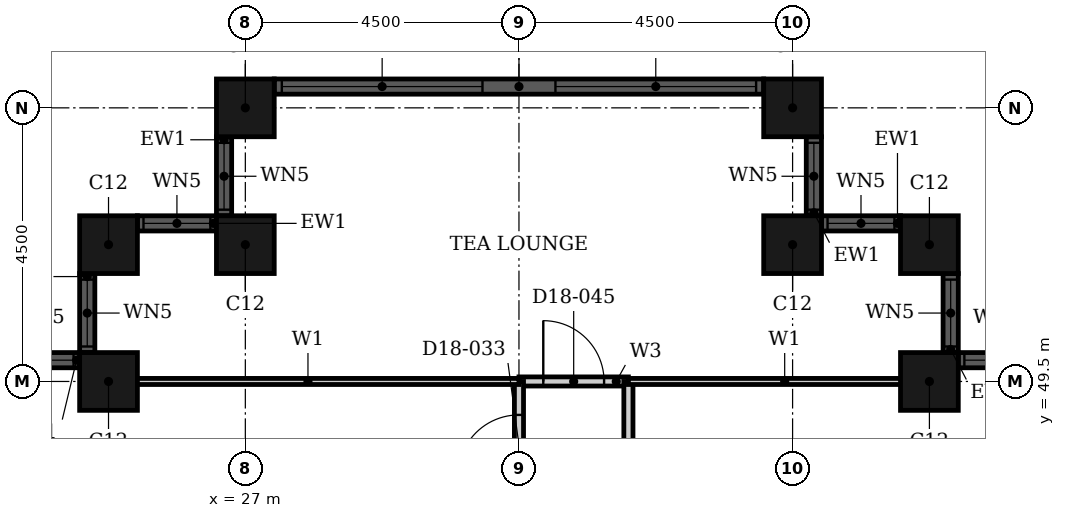
"""IFC4 building model, lengths in metres.
Left out: names, types, materials, properties, quantities, classifications, styles, units other than length and angle.
Written with IfcOpenShell. Run it as: python <this file> out.ifc"""

import sys

from ifc_helpers import new_model, si_unit, direction, frame, frame_2d, origin, origin_2d, place, context, subcontext, project, spatial, rectangle, hollow_rectangle, extrude, element, fill, save


model = new_model("IFC4")
c1 = context("Model", 3, precision=1e-05, world=origin(), true_north=direction((0.0, 1.0)))
c2 = subcontext(c1, "Body", "Model", "MODEL_VIEW")
j1 = project(units=[si_unit("LENGTHUNIT", "METRE"), si_unit("PLANEANGLEUNIT", "RADIAN")], contexts=[c1])
p1 = place(None, origin())
s1 = spatial("IfcSite", under=j1, at=p1, CompositionType="ELEMENT")
p2 = place(p1, origin())
s2 = spatial("IfcBuilding", under=s1, at=p2, CompositionType="ELEMENT")
p3 = place(p2, frame((0.0, 0.0, 78.0)))
s3 = spatial("IfcBuildingStorey", under=s2, at=p3, CompositionType="ELEMENT", Elevation=78.0)
for number, where, z_axis, x_axis in (
    (1, (38.25, 49.5, 0.0), (0.0, 0.0, 1.0), (1.0, 0.0, 0.0)),
    (2, (38.25, 51.75, 0.0), (0.0, 0.0, 1.0), (1.0, 0.0, 0.0)),
    (3, (36.0, 51.75, 0.0), (0.0, 0.0, 1.0), (1.0, 0.0, 0.0)),
    (4, (36.0, 54.0, 0.0), (0.0, 0.0, 1.0), (1.0, 0.0, 0.0)),
    (5, (27.0, 54.0, 0.0), (0.0, 0.0, 1.0), (1.0, 0.0, 0.0)),
    (6, (27.0, 51.75, 0.0), (0.0, 0.0, 1.0), (1.0, 0.0, 0.0)),
    (7, (24.75, 51.75, 0.0), (0.0, 0.0, 1.0), (1.0, 0.0, 0.0)),
    (8, (24.75, 49.5, 0.0), (0.0, 0.0, 1.0), (1.0, 0.0, 0.0)),
):
    element("IfcColumn", number, at=place(p3, frame(where, z_axis=z_axis, x_axis=x_axis)), inside=s3, PredefinedType="COLUMN", context=c2, shape_type="SweptSolid", body=[
        extrude(hollow_rectangle(XDim=0.95, YDim=0.95, WallThickness=0.03, at=origin_2d()), origin(), (0.0, 0.0, 1.0), 3.6),
    ])
p4 = place(p3, frame((40.025, 49.85, 0.0), z_axis=(0.0, 0.0, 1.0), x_axis=(-1.0, 0.0, 0.0)))
e9 = element("IfcWall", 9, at=p4, inside=s3, PredefinedType="SOLIDWALL", context=c2, shape_type="SweptSolid", body=[
    extrude(rectangle(XDim=1.3, YDim=0.25, at=frame_2d((0.65, 0.0))), origin(), (0.0, 0.0, 1.0), 3.6),
])
p5 = place(p4, frame((0.1, 0.0, 0.9)))
e10 = element("IfcOpeningElement", 10, at=p5, cuts=e9, PredefinedType="OPENING", context=c2, shape_type="SweptSolid", body=[
    extrude(rectangle(XDim=1.1, YDim=2.08, at=frame_2d((0.55, 1.04))), frame((0.0, 0.135, 0.0), z_axis=(0.0, -1.0, 0.0), x_axis=(1.0, 0.0, 0.0)), (0.0, 0.0, 1.0), 0.27),
])
p6 = place(p3, frame((38.6, 49.975, 0.0), z_axis=(0.0, 0.0, 1.0), x_axis=(0.0, 1.0, 0.0)))
e11 = element("IfcWall", 11, at=p6, inside=s3, PredefinedType="SOLIDWALL", context=c2, shape_type="SweptSolid", body=[
    extrude(rectangle(XDim=1.3, YDim=0.25, at=frame_2d((0.65, 0.0))), origin(), (0.0, 0.0, 1.0), 3.6),
])
p7 = place(p6, frame((0.1, 0.0, 0.9)))
e12 = element("IfcOpeningElement", 12, at=p7, cuts=e11, PredefinedType="OPENING", context=c2, shape_type="SweptSolid", body=[
    extrude(rectangle(XDim=1.1, YDim=2.08, at=frame_2d((0.55, 1.04))), frame((0.0, 0.135, 0.0), z_axis=(0.0, -1.0, 0.0), x_axis=(1.0, 0.0, 0.0)), (0.0, 0.0, 1.0), 0.27),
])
p8 = place(p3, frame((37.775, 52.1, 0.0), z_axis=(0.0, 0.0, 1.0), x_axis=(-1.0, 0.0, 0.0)))
e13 = element("IfcWall", 13, at=p8, inside=s3, PredefinedType="SOLIDWALL", context=c2, shape_type="SweptSolid", body=[
    extrude(rectangle(XDim=1.3, YDim=0.25, at=frame_2d((0.65, 0.0))), origin(), (0.0, 0.0, 1.0), 3.6),
])
p9 = place(p8, frame((0.1, 0.0, 0.9)))
e14 = element("IfcOpeningElement", 14, at=p9, cuts=e13, PredefinedType="OPENING", context=c2, shape_type="SweptSolid", body=[
    extrude(rectangle(XDim=1.1, YDim=2.08, at=frame_2d((0.55, 1.04))), frame((0.0, 0.135, 0.0), z_axis=(0.0, -1.0, 0.0), x_axis=(1.0, 0.0, 0.0)), (0.0, 0.0, 1.0), 0.27),
])
p10 = place(p3, frame((36.35, 52.225, 0.0), z_axis=(0.0, 0.0, 1.0), x_axis=(0.0, 1.0, 0.0)))
e15 = element("IfcWall", 15, at=p10, inside=s3, PredefinedType="SOLIDWALL", context=c2, shape_type="SweptSolid", body=[
    extrude(rectangle(XDim=1.3, YDim=0.25, at=frame_2d((0.65, 0.0))), origin(), (0.0, 0.0, 1.0), 3.6),
])
p11 = place(p10, frame((0.1, 0.0, 0.9)))
e16 = element("IfcOpeningElement", 16, at=p11, cuts=e15, PredefinedType="OPENING", context=c2, shape_type="SweptSolid", body=[
    extrude(rectangle(XDim=1.1, YDim=2.08, at=frame_2d((0.55, 1.04))), frame((0.0, 0.135, 0.0), z_axis=(0.0, -1.0, 0.0), x_axis=(1.0, 0.0, 0.0)), (0.0, 0.0, 1.0), 0.27),
])
p12 = place(p3, frame((35.525, 54.35, 0.0), z_axis=(0.0, 0.0, 1.0), x_axis=(-1.0, 0.0, 0.0)))
e17 = element("IfcWall", 17, at=p12, inside=s3, PredefinedType="SOLIDWALL", context=c2, shape_type="SweptSolid", body=[
    extrude(rectangle(XDim=8.05, YDim=0.25, at=frame_2d((4.025, 0.0))), origin(), (0.0, 0.0, 1.0), 3.6),
])
p13 = place(p12, frame((0.125, 0.0, 0.9)))
e18 = element("IfcOpeningElement", 18, at=p13, cuts=e17, PredefinedType="OPENING", context=c2, shape_type="SweptSolid", body=[
    extrude(rectangle(XDim=3.3, YDim=2.08, at=frame_2d((1.65, 1.04))), frame((0.0, 0.135, 0.0), z_axis=(0.0, -1.0, 0.0), x_axis=(1.0, 0.0, 0.0)), (0.0, 0.0, 1.0), 0.27),
])
p14 = place(p12, frame((4.625, 0.0, 0.9)))
e19 = element("IfcOpeningElement", 19, at=p14, cuts=e17, PredefinedType="OPENING", context=c2, shape_type="SweptSolid", body=[
    extrude(rectangle(XDim=3.3, YDim=2.08, at=frame_2d((1.65, 1.04))), frame((0.0, 0.135, 0.0), z_axis=(0.0, -1.0, 0.0), x_axis=(1.0, 0.0, 0.0)), (0.0, 0.0, 1.0), 0.27),
])
p15 = place(p3, frame((26.65, 53.525, 0.0), z_axis=(0.0, 0.0, 1.0), x_axis=(0.0, -1.0, 0.0)))
e20 = element("IfcWall", 20, at=p15, inside=s3, PredefinedType="SOLIDWALL", context=c2, shape_type="SweptSolid", body=[
    extrude(rectangle(XDim=1.3, YDim=0.25, at=frame_2d((0.65, 0.0))), origin(), (0.0, 0.0, 1.0), 3.6),
])
p16 = place(p15, frame((0.1, 0.0, 0.9)))
e21 = element("IfcOpeningElement", 21, at=p16, cuts=e20, PredefinedType="OPENING", context=c2, shape_type="SweptSolid", body=[
    extrude(rectangle(XDim=1.1, YDim=2.08, at=frame_2d((0.55, 1.04))), frame((0.0, 0.135, 0.0), z_axis=(0.0, -1.0, 0.0), x_axis=(1.0, 0.0, 0.0)), (0.0, 0.0, 1.0), 0.27),
])
p17 = place(p3, frame((26.525, 52.1, 0.0), z_axis=(0.0, 0.0, 1.0), x_axis=(-1.0, 0.0, 0.0)))
e22 = element("IfcWall", 22, at=p17, inside=s3, PredefinedType="SOLIDWALL", context=c2, shape_type="SweptSolid", body=[
    extrude(rectangle(XDim=1.3, YDim=0.25, at=frame_2d((0.65, 0.0))), origin(), (0.0, 0.0, 1.0), 3.6),
])
p18 = place(p17, frame((0.1, 0.0, 0.9)))
e23 = element("IfcOpeningElement", 23, at=p18, cuts=e22, PredefinedType="OPENING", context=c2, shape_type="SweptSolid", body=[
    extrude(rectangle(XDim=1.1, YDim=2.08, at=frame_2d((0.55, 1.04))), frame((0.0, 0.135, 0.0), z_axis=(0.0, -1.0, 0.0), x_axis=(1.0, 0.0, 0.0)), (0.0, 0.0, 1.0), 0.27),
])
p19 = place(p3, frame((24.4, 51.275, 0.0), z_axis=(0.0, 0.0, 1.0), x_axis=(0.0, -1.0, 0.0)))
e24 = element("IfcWall", 24, at=p19, inside=s3, PredefinedType="SOLIDWALL", context=c2, shape_type="SweptSolid", body=[
    extrude(rectangle(XDim=1.3, YDim=0.25, at=frame_2d((0.65, 0.0))), origin(), (0.0, 0.0, 1.0), 3.6),
])
p20 = place(p19, frame((0.1, 0.0, 0.9)))
e25 = element("IfcOpeningElement", 25, at=p20, cuts=e24, PredefinedType="OPENING", context=c2, shape_type="SweptSolid", body=[
    extrude(rectangle(XDim=1.1, YDim=2.08, at=frame_2d((0.55, 1.04))), frame((0.0, 0.135, 0.0), z_axis=(0.0, -1.0, 0.0), x_axis=(1.0, 0.0, 0.0)), (0.0, 0.0, 1.0), 0.27),
])
p21 = place(p3, frame((24.275, 49.85, 0.0), z_axis=(0.0, 0.0, 1.0), x_axis=(-1.0, 0.0, 0.0)))
e26 = element("IfcWall", 26, at=p21, inside=s3, PredefinedType="SOLIDWALL", context=c2, shape_type="SweptSolid", body=[
    extrude(rectangle(XDim=1.3, YDim=0.25, at=frame_2d((0.65, 0.0))), origin(), (0.0, 0.0, 1.0), 3.6),
])
p22 = place(p21, frame((0.1, 0.0, 0.9)))
e27 = element("IfcOpeningElement", 27, at=p22, cuts=e26, PredefinedType="OPENING", context=c2, shape_type="SweptSolid", body=[
    extrude(rectangle(XDim=1.1, YDim=2.08, at=frame_2d((0.55, 1.04))), frame((0.0, 0.135, 0.0), z_axis=(0.0, -1.0, 0.0), x_axis=(1.0, 0.0, 0.0)), (0.0, 0.0, 1.0), 0.27),
])
p23 = place(p3, frame((31.5, 49.5, 0.0), z_axis=(0.0, 0.0, 1.0), x_axis=(1.0, 0.0, 0.0)))
e28 = element("IfcWall", 28, at=p23, inside=s3, PredefinedType="PARTITIONING", context=c2, shape_type="SweptSolid", body=[
    extrude(rectangle(XDim=1.8, YDim=0.15, at=frame_2d((0.9, 0.0))), origin(), (0.0, 0.0, 1.0), 3.3),
])
p24 = place(p23, frame((0.4, 0.0, 0.0)))
e29 = element("IfcOpeningElement", 29, at=p24, cuts=e28, PredefinedType="OPENING", context=c2, shape_type="SweptSolid", body=[
    extrude(rectangle(XDim=1.0, YDim=2.1, at=frame_2d((0.5, 1.05))), frame((0.0, 0.085, 0.0), z_axis=(0.0, -1.0, 0.0), x_axis=(1.0, 0.0, 0.0)), (0.0, 0.0, 1.0), 0.17),
])
p25 = place(p3, frame((31.5, 33.3, 0.0), z_axis=(0.0, 0.0, 1.0), x_axis=(0.0, 1.0, 0.0)))
e30 = element("IfcWall", 30, at=p25, inside=s3, PredefinedType="PARTITIONING", context=c2, shape_type="SweptSolid", body=[
    extrude(rectangle(XDim=16.2, YDim=0.15, at=frame_2d((8.1, 0.0))), origin(), (0.0, 0.0, 1.0), 2.58),
])
p26 = place(p25, frame((10.15, 0.0, 0.0)))
e31 = element("IfcOpeningElement", 31, at=p26, cuts=e30, PredefinedType="OPENING", context=c2, shape_type="SweptSolid", body=[
    extrude(rectangle(XDim=1.0, YDim=2.1, at=frame_2d((0.5, 1.05))), frame((0.0, 0.085, 0.0), z_axis=(0.0, -1.0, 0.0), x_axis=(1.0, 0.0, 0.0)), (0.0, 0.0, 1.0), 0.17),
])
p27 = place(p25, frame((14.65, 0.0, 0.0)))
e32 = element("IfcOpeningElement", 32, at=p27, cuts=e30, PredefinedType="OPENING", context=c2, shape_type="SweptSolid", body=[
    extrude(rectangle(XDim=1.0, YDim=2.1, at=frame_2d((0.5, 1.05))), frame((0.0, 0.085, 0.0), z_axis=(0.0, -1.0, 0.0), x_axis=(1.0, 0.0, 0.0)), (0.0, 0.0, 1.0), 0.17),
])
p28 = place(p3, frame((33.3, 33.3, 0.0), z_axis=(0.0, 0.0, 1.0), x_axis=(0.0, 1.0, 0.0)))
e33 = element("IfcWall", 33, at=p28, inside=s3, PredefinedType="PARTITIONING", context=c2, shape_type="SweptSolid", body=[
    extrude(rectangle(XDim=16.2, YDim=0.15, at=frame_2d((8.1, 0.0))), origin(), (0.0, 0.0, 1.0), 3.3),
])
p29 = place(p28, frame((8.95, 0.0, 0.0)))
e34 = element("IfcOpeningElement", 34, at=p29, cuts=e33, PredefinedType="OPENING", context=c2, shape_type="SweptSolid", body=[
    extrude(rectangle(XDim=1.0, YDim=2.1, at=frame_2d((0.5, 1.05))), frame((0.0, 0.085, 0.0), z_axis=(0.0, -1.0, 0.0), x_axis=(1.0, 0.0, 0.0)), (0.0, 0.0, 1.0), 0.17),
])
p30 = place(p3, frame((24.56, 49.5, 0.0), z_axis=(0.0, 0.0, 1.0), x_axis=(1.0, 0.0, 0.0)))
e35 = element("IfcWall", 35, at=p30, inside=s3, PredefinedType="PARTITIONING", context=c2, shape_type="SweptSolid", body=[
    extrude(rectangle(XDim=6.94, YDim=0.1, at=frame_2d((3.47, 0.0))), origin(), (0.0, 0.0, 1.0), 3.3),
])
p31 = place(p3, frame((33.3, 49.5, 0.0), z_axis=(0.0, 0.0, 1.0), x_axis=(1.0, 0.0, 0.0)))
e36 = element("IfcWall", 36, at=p31, inside=s3, PredefinedType="PARTITIONING", context=c2, shape_type="SweptSolid", body=[
    extrude(rectangle(XDim=5.14, YDim=0.1, at=frame_2d((2.57, 0.0))), origin(), (0.0, 0.0, 1.0), 3.3),
])
p32 = place(p5, origin())
e37 = element("IfcWindow", 37, at=p32, inside=s3, PartitioningType="SINGLE_PANEL", PredefinedType="WINDOW", context=c2, shape_type="SweptSolid", body=[
    extrude(rectangle(XDim=1.1, YDim=2.08, at=frame_2d((0.55, 1.04))), frame((0.0, 0.03, 0.0), z_axis=(0.0, -1.0, 0.0), x_axis=(1.0, 0.0, 0.0)), (0.0, 0.0, 1.0), 0.06),
])
fill(e10, e37)
p33 = place(p7, origin())
e38 = element("IfcWindow", 38, at=p33, inside=s3, PartitioningType="SINGLE_PANEL", PredefinedType="WINDOW", context=c2, shape_type="SweptSolid", body=[
    extrude(rectangle(XDim=1.1, YDim=2.08, at=frame_2d((0.55, 1.04))), frame((0.0, 0.03, 0.0), z_axis=(0.0, -1.0, 0.0), x_axis=(1.0, 0.0, 0.0)), (0.0, 0.0, 1.0), 0.06),
])
fill(e12, e38)
p34 = place(p9, origin())
e39 = element("IfcWindow", 39, at=p34, inside=s3, PartitioningType="SINGLE_PANEL", PredefinedType="WINDOW", context=c2, shape_type="SweptSolid", body=[
    extrude(rectangle(XDim=1.1, YDim=2.08, at=frame_2d((0.55, 1.04))), frame((0.0, 0.03, 0.0), z_axis=(0.0, -1.0, 0.0), x_axis=(1.0, 0.0, 0.0)), (0.0, 0.0, 1.0), 0.06),
])
fill(e14, e39)
p35 = place(p11, origin())
e40 = element("IfcWindow", 40, at=p35, inside=s3, PartitioningType="SINGLE_PANEL", PredefinedType="WINDOW", context=c2, shape_type="SweptSolid", body=[
    extrude(rectangle(XDim=1.1, YDim=2.08, at=frame_2d((0.55, 1.04))), frame((0.0, 0.03, 0.0), z_axis=(0.0, -1.0, 0.0), x_axis=(1.0, 0.0, 0.0)), (0.0, 0.0, 1.0), 0.06),
])
fill(e16, e40)
p36 = place(p13, origin())
e41 = element("IfcWindow", 41, at=p36, inside=s3, PartitioningType="SINGLE_PANEL", PredefinedType="WINDOW", context=c2, shape_type="SweptSolid", body=[
    extrude(rectangle(XDim=3.3, YDim=2.08, at=frame_2d((1.65, 1.04))), frame((0.0, 0.03, 0.0), z_axis=(0.0, -1.0, 0.0), x_axis=(1.0, 0.0, 0.0)), (0.0, 0.0, 1.0), 0.06),
])
fill(e18, e41)
p37 = place(p14, origin())
e42 = element("IfcWindow", 42, at=p37, inside=s3, PartitioningType="SINGLE_PANEL", PredefinedType="WINDOW", context=c2, shape_type="SweptSolid", body=[
    extrude(rectangle(XDim=3.3, YDim=2.08, at=frame_2d((1.65, 1.04))), frame((0.0, 0.03, 0.0), z_axis=(0.0, -1.0, 0.0), x_axis=(1.0, 0.0, 0.0)), (0.0, 0.0, 1.0), 0.06),
])
fill(e19, e42)
p38 = place(p16, origin())
e43 = element("IfcWindow", 43, at=p38, inside=s3, PartitioningType="SINGLE_PANEL", PredefinedType="WINDOW", context=c2, shape_type="SweptSolid", body=[
    extrude(rectangle(XDim=1.1, YDim=2.08, at=frame_2d((0.55, 1.04))), frame((0.0, 0.03, 0.0), z_axis=(0.0, -1.0, 0.0), x_axis=(1.0, 0.0, 0.0)), (0.0, 0.0, 1.0), 0.06),
])
fill(e21, e43)
p39 = place(p18, origin())
e44 = element("IfcWindow", 44, at=p39, inside=s3, PartitioningType="SINGLE_PANEL", PredefinedType="WINDOW", context=c2, shape_type="SweptSolid", body=[
    extrude(rectangle(XDim=1.1, YDim=2.08, at=frame_2d((0.55, 1.04))), frame((0.0, 0.03, 0.0), z_axis=(0.0, -1.0, 0.0), x_axis=(1.0, 0.0, 0.0)), (0.0, 0.0, 1.0), 0.06),
])
fill(e23, e44)
p40 = place(p20, origin())
e45 = element("IfcWindow", 45, at=p40, inside=s3, PartitioningType="SINGLE_PANEL", PredefinedType="WINDOW", context=c2, shape_type="SweptSolid", body=[
    extrude(rectangle(XDim=1.1, YDim=2.08, at=frame_2d((0.55, 1.04))), frame((0.0, 0.03, 0.0), z_axis=(0.0, -1.0, 0.0), x_axis=(1.0, 0.0, 0.0)), (0.0, 0.0, 1.0), 0.06),
])
fill(e25, e45)
p41 = place(p22, origin())
e46 = element("IfcWindow", 46, at=p41, inside=s3, PartitioningType="SINGLE_PANEL", PredefinedType="WINDOW", context=c2, shape_type="SweptSolid", body=[
    extrude(rectangle(XDim=1.1, YDim=2.08, at=frame_2d((0.55, 1.04))), frame((0.0, 0.03, 0.0), z_axis=(0.0, -1.0, 0.0), x_axis=(1.0, 0.0, 0.0)), (0.0, 0.0, 1.0), 0.06),
])
fill(e27, e46)
p42 = place(p27, origin())
e47 = element("IfcDoor", 47, at=p42, inside=s3, OperationType="SINGLE_SWING_RIGHT", PredefinedType="DOOR", context=c2, shape_type="SweptSolid", body=[
    extrude(rectangle(XDim=1.0, YDim=2.1, at=frame_2d((0.5, 1.05))), frame((0.0, 0.025, 0.0), z_axis=(0.0, -1.0, 0.0), x_axis=(1.0, 0.0, 0.0)), (0.0, 0.0, 1.0), 0.05),
])
fill(e32, e47)
p43 = place(p24, origin())
e48 = element("IfcDoor", 48, at=p43, inside=s3, OperationType="SINGLE_SWING_RIGHT", PredefinedType="DOOR", context=c2, shape_type="SweptSolid", body=[
    extrude(rectangle(XDim=1.0, YDim=2.1, at=frame_2d((0.5, 1.05))), frame((0.0, 0.025, 0.0), z_axis=(0.0, -1.0, 0.0), x_axis=(1.0, 0.0, 0.0)), (0.0, 0.0, 1.0), 0.05),
])
fill(e29, e48)
save(model, sys.argv[1])
